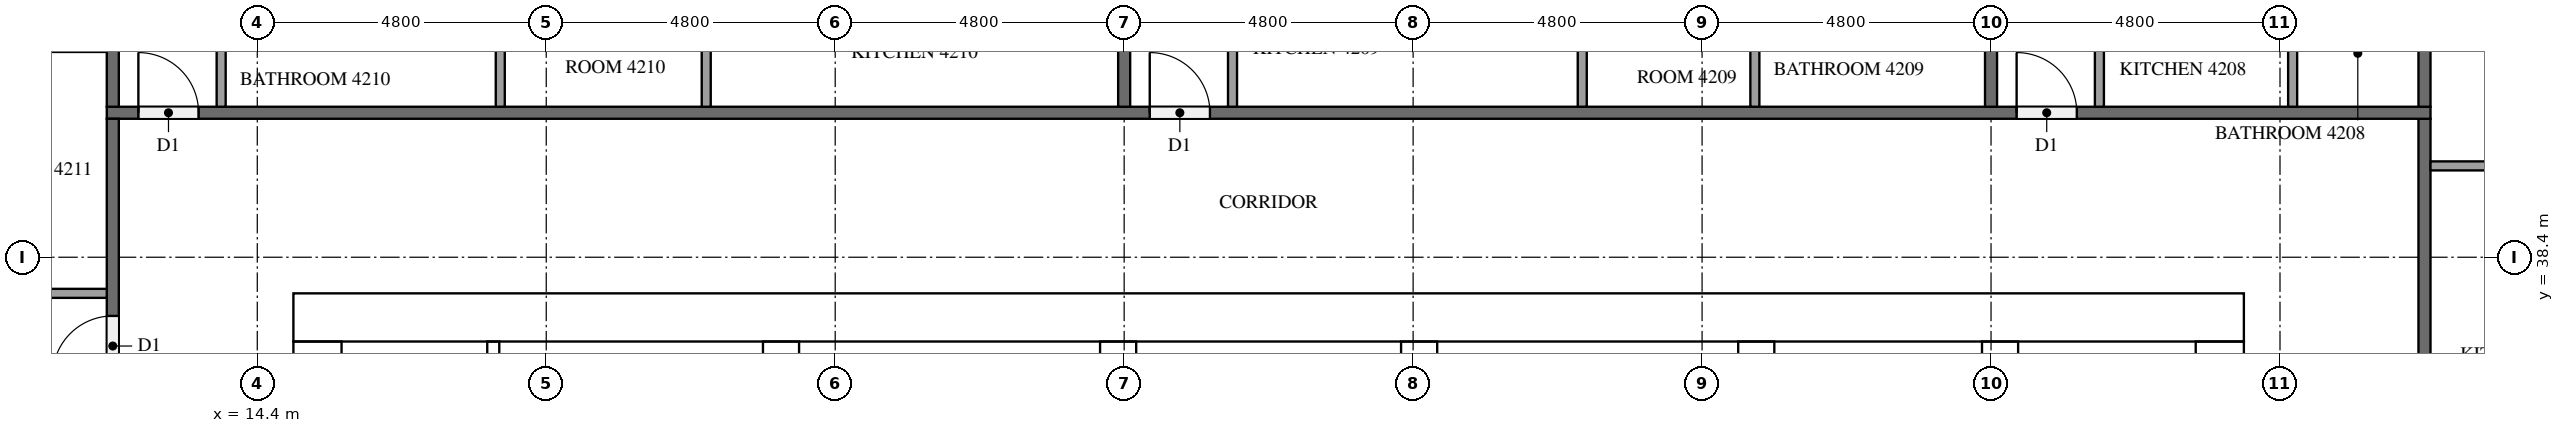
"""IFC4 building model, lengths in metres.
Left out: names, types, materials, properties, quantities, classifications, styles, units other than length and angle.
Written with IfcOpenShell. Run it as: python <this file> out.ifc"""

import sys

from ifc_helpers import new_model, si_unit, direction, frame, frame_2d, origin, place, context, subcontext, project, spatial, rectangle, extrude, element, fill, save


model = new_model("IFC4")
c1 = context("Model", 3, precision=1e-05, world=origin(), true_north=direction((0.0, 1.0)))
c2 = subcontext(c1, "Body", "Model", "MODEL_VIEW")
j1 = project(units=[si_unit("LENGTHUNIT", "METRE"), si_unit("PLANEANGLEUNIT", "RADIAN")], contexts=[c1])
p1 = place(None, origin())
s1 = spatial("IfcSite", under=j1, at=p1, CompositionType="ELEMENT")
p2 = place(p1, origin())
s2 = spatial("IfcBuilding", under=s1, at=p2, CompositionType="ELEMENT")
p3 = place(p2, frame((0.0, 0.0, 163.0)))
s3 = spatial("IfcBuildingStorey", under=s2, at=p3, CompositionType="ELEMENT", Elevation=163.0)
p4 = place(p3, frame((15.0, 37.4, 0.0), z_axis=(0.0, 0.0, 1.0), x_axis=(1.0, 0.0, 0.0)))
e1 = element("IfcWall", 1, at=p4, inside=s3, PredefinedType="SHEAR", context=c2, shape_type="SweptSolid", body=[
    extrude(rectangle(XDim=32.4, YDim=0.8, at=frame_2d((16.2, 0.0))), origin(), (0.0, 0.0, 1.0), 3.2),
])
p5 = place(p4, frame((15.3, 0.0, 0.0)))
e2 = element("IfcOpeningElement", 2, at=p5, cuts=e1, PredefinedType="OPENING", context=c2, shape_type="SweptSolid", body=[
    extrude(rectangle(XDim=1.8, YDim=2.1, at=frame_2d((0.9, 1.05))), frame((0.0, 0.41, 0.0), z_axis=(0.0, -1.0, 0.0), x_axis=(1.0, 0.0, 0.0)), (0.0, 0.0, 1.0), 0.82),
])
p6 = place(p4, frame((1.51, 0.0, 0.0)))
e3 = element("IfcOpeningElement", 3, at=p6, cuts=e1, PredefinedType="OPENING", context=c2, shape_type="SweptSolid", body=[
    extrude(rectangle(XDim=1.0, YDim=2.1, at=frame_2d((0.5, 1.05))), frame((0.0, 0.41, 0.0), z_axis=(0.0, -1.0, 0.0), x_axis=(1.0, 0.0, 0.0)), (0.0, 0.0, 1.0), 0.82),
])
p7 = place(p4, frame((5.11, 0.0, 0.0)))
e4 = element("IfcOpeningElement", 4, at=p7, cuts=e1, PredefinedType="OPENING", context=c2, shape_type="SweptSolid", body=[
    extrude(rectangle(XDim=1.0, YDim=2.1, at=frame_2d((0.5, 1.05))), frame((0.0, 0.41, 0.0), z_axis=(0.0, -1.0, 0.0), x_axis=(1.0, 0.0, 0.0)), (0.0, 0.0, 1.0), 0.82),
])
p8 = place(p3, frame((15.4, 15.8, 0.0), z_axis=(0.0, 0.0, 1.0), x_axis=(0.0, 1.0, 0.0)))
e5 = element("IfcWall", 5, at=p8, inside=s3, PredefinedType="SHEAR", context=c2, shape_type="SweptSolid", body=[
    extrude(rectangle(XDim=21.2, YDim=0.8, at=frame_2d((10.6, 0.0))), origin(), (0.0, 0.0, 1.0), 3.2),
])
p9 = place(p8, frame((4.96, 0.0, 0.0)))
e6 = element("IfcOpeningElement", 6, at=p9, cuts=e5, PredefinedType="OPENING", context=c2, shape_type="SweptSolid", body=[
    extrude(rectangle(XDim=1.2, YDim=2.1, at=frame_2d((0.6, 1.05))), frame((0.0, 0.41, 0.0), z_axis=(0.0, -1.0, 0.0), x_axis=(1.0, 0.0, 0.0)), (0.0, 0.0, 1.0), 0.82),
])
p10 = place(p3, frame((47.0, 15.8, 0.0), z_axis=(0.0, 0.0, 1.0), x_axis=(0.0, 1.0, 0.0)))
e7 = element("IfcWall", 7, at=p10, inside=s3, PredefinedType="SHEAR", context=c2, shape_type="SweptSolid", body=[
    extrude(rectangle(XDim=21.2, YDim=0.8, at=frame_2d((10.6, 0.0))), origin(), (0.0, 0.0, 1.0), 3.2),
])
p11 = place(p10, frame((10.3, 0.0, 0.0)))
e8 = element("IfcOpeningElement", 8, at=p11, cuts=e7, PredefinedType="OPENING", context=c2, shape_type="SweptSolid", body=[
    extrude(rectangle(XDim=1.2, YDim=2.1, at=frame_2d((0.6, 1.05))), frame((0.0, 0.41, 0.0), z_axis=(0.0, -1.0, 0.0), x_axis=(1.0, 0.0, 0.0)), (0.0, 0.0, 1.0), 0.82),
])
p12 = place(p3, frame((23.1, 15.8, 0.0), z_axis=(0.0, 0.0, 1.0), x_axis=(0.0, 1.0, 0.0)))
e9 = element("IfcWall", 9, at=p12, inside=s3, PredefinedType="SHEAR", context=c2, shape_type="SweptSolid", body=[
    extrude(rectangle(XDim=21.2, YDim=0.6, at=frame_2d((10.6, 0.0))), origin(), (0.0, 0.0, 1.0), 3.2),
])
p13 = place(p3, frame((39.3, 27.75, 0.0), z_axis=(0.0, 0.0, 1.0), x_axis=(0.0, 1.0, 0.0)))
e10 = element("IfcWall", 10, at=p13, inside=s3, PredefinedType="SHEAR", context=c2, shape_type="SweptSolid", body=[
    extrude(rectangle(XDim=9.25, YDim=0.6, at=frame_2d((4.625, 0.0))), origin(), (0.0, 0.0, 1.0), 3.2),
])
p14 = place(p3, frame((43.35, 27.75, 0.0), z_axis=(0.0, 0.0, 1.0), x_axis=(0.0, 1.0, 0.0)))
e11 = element("IfcWall", 11, at=p14, inside=s3, PredefinedType="SHEAR", context=c2, shape_type="SweptSolid", body=[
    extrude(rectangle(XDim=9.25, YDim=0.6, at=frame_2d((4.625, 0.0))), origin(), (0.0, 0.0, 1.0), 3.2),
])
p15 = place(p14, frame((7.65, 0.0, 0.0)))
e12 = element("IfcOpeningElement", 12, at=p15, cuts=e11, PredefinedType="OPENING", context=c2, shape_type="SweptSolid", body=[
    extrude(rectangle(XDim=1.2, YDim=2.1, at=frame_2d((0.6, 1.05))), frame((0.0, 0.31, 0.0), z_axis=(0.0, -1.0, 0.0), x_axis=(1.0, 0.0, 0.0)), (0.0, 0.0, 1.0), 0.62),
])
for number, where, z_axis, x_axis in (
    (13, (28.7, 33.85, 0.0), (0.0, 0.0, 1.0), (0.0, 1.0, 0.0)),
    (14, (33.7, 33.85, 0.0), (0.0, 0.0, 1.0), (0.0, 1.0, 0.0)),
):
    element("IfcWall", number, at=place(p3, frame(where, z_axis=z_axis, x_axis=x_axis)), inside=s3, PredefinedType="SHEAR", context=c2, shape_type="SweptSolid", body=[
        extrude(rectangle(XDim=3.15, YDim=0.6, at=frame_2d((1.575, 0.0))), origin(), (0.0, 0.0, 1.0), 3.2),
    ])
p16 = place(p3, frame((18.32, 31.55, 0.0), z_axis=(0.0, 0.0, 1.0), x_axis=(0.0, 1.0, 0.0)))
e15 = element("IfcWall", 15, at=p16, inside=s3, PredefinedType="PARTITIONING", context=c2, shape_type="SweptSolid", body=[
    extrude(rectangle(XDim=5.45, YDim=0.2, at=frame_2d((2.725, 0.0))), origin(), (0.0, 0.0, 1.0), 3.2),
])
p17 = place(p3, frame((50.4, 40.7, 0.0), z_axis=(0.0, 0.0, 1.0), x_axis=(0.0, -1.0, 0.0)))
e16 = element("IfcWall", 16, at=p17, inside=s3, PredefinedType="PARTITIONING", context=c2, shape_type="SweptSolid", body=[
    extrude(rectangle(XDim=28.6, YDim=0.2, at=frame_2d((14.3, 0.0))), origin(), (0.0, 0.0, 1.0), 3.2),
])
p18 = place(p17, frame((19.525, 0.0, 0.0)))
e17 = element("IfcOpeningElement", 17, at=p18, cuts=e16, PredefinedType="OPENING", context=c2, shape_type="SweptSolid", body=[
    extrude(rectangle(XDim=1.0, YDim=2.1, at=frame_2d((0.5, 1.05))), frame((0.0, 0.11, 0.0), z_axis=(0.0, -1.0, 0.0), x_axis=(1.0, 0.0, 0.0)), (0.0, 0.0, 1.0), 0.22),
])
p19 = place(p17, frame((17.675, 0.0, 0.0)))
e18 = element("IfcOpeningElement", 18, at=p19, cuts=e16, PredefinedType="OPENING", context=c2, shape_type="SweptSolid", body=[
    extrude(rectangle(XDim=1.0, YDim=2.1, at=frame_2d((0.5, 1.05))), frame((0.0, 0.11, 0.0), z_axis=(0.0, -1.0, 0.0), x_axis=(1.0, 0.0, 0.0)), (0.0, 0.0, 1.0), 0.22),
])
p20 = place(p17, frame((8.075, 0.0, 0.0)))
e19 = element("IfcOpeningElement", 19, at=p20, cuts=e16, PredefinedType="OPENING", context=c2, shape_type="SweptSolid", body=[
    extrude(rectangle(XDim=1.0, YDim=2.1, at=frame_2d((0.5, 1.05))), frame((0.0, 0.11, 0.0), z_axis=(0.0, -1.0, 0.0), x_axis=(1.0, 0.0, 0.0)), (0.0, 0.0, 1.0), 0.22),
])
p21 = place(p3, frame((11.9, 40.8, 0.0), z_axis=(0.0, 0.0, 1.0), x_axis=(1.0, 0.0, 0.0)))
e20 = element("IfcWall", 20, at=p21, inside=s3, PredefinedType="PARTITIONING", context=c2, shape_type="SweptSolid", body=[
    extrude(rectangle(XDim=38.6, YDim=0.2, at=frame_2d((19.3, 0.0))), origin(), (0.0, 0.0, 1.0), 3.2),
])
p22 = place(p21, frame((31.725, 0.0, 0.0)))
e21 = element("IfcOpeningElement", 21, at=p22, cuts=e20, PredefinedType="OPENING", context=c2, shape_type="SweptSolid", body=[
    extrude(rectangle(XDim=1.0, YDim=2.1, at=frame_2d((0.5, 1.05))), frame((0.0, 0.11, 0.0), z_axis=(0.0, -1.0, 0.0), x_axis=(1.0, 0.0, 0.0)), (0.0, 0.0, 1.0), 0.22),
])
p23 = place(p21, frame((17.325, 0.0, 0.0)))
e22 = element("IfcOpeningElement", 22, at=p23, cuts=e20, PredefinedType="OPENING", context=c2, shape_type="SweptSolid", body=[
    extrude(rectangle(XDim=1.0, YDim=2.1, at=frame_2d((0.5, 1.05))), frame((0.0, 0.11, 0.0), z_axis=(0.0, -1.0, 0.0), x_axis=(1.0, 0.0, 0.0)), (0.0, 0.0, 1.0), 0.22),
])
p24 = place(p21, frame((0.525, 0.0, 0.0)))
e23 = element("IfcOpeningElement", 23, at=p24, cuts=e20, PredefinedType="OPENING", context=c2, shape_type="SweptSolid", body=[
    extrude(rectangle(XDim=1.0, YDim=2.1, at=frame_2d((0.5, 1.05))), frame((0.0, 0.11, 0.0), z_axis=(0.0, -1.0, 0.0), x_axis=(1.0, 0.0, 0.0)), (0.0, 0.0, 1.0), 0.22),
])
p25 = place(p3, frame((12.0, 12.1, 0.0), z_axis=(0.0, 0.0, 1.0), x_axis=(0.0, 1.0, 0.0)))
e24 = element("IfcWall", 24, at=p25, inside=s3, PredefinedType="PARTITIONING", context=c2, shape_type="SweptSolid", body=[
    extrude(rectangle(XDim=28.6, YDim=0.2, at=frame_2d((14.3, 0.0))), origin(), (0.0, 0.0, 1.0), 3.2),
])
p26 = place(p25, frame((24.325, 0.0, 0.0)))
e25 = element("IfcOpeningElement", 25, at=p26, cuts=e24, PredefinedType="OPENING", context=c2, shape_type="SweptSolid", body=[
    extrude(rectangle(XDim=1.0, YDim=2.1, at=frame_2d((0.5, 1.05))), frame((0.0, 0.11, 0.0), z_axis=(0.0, -1.0, 0.0), x_axis=(1.0, 0.0, 0.0)), (0.0, 0.0, 1.0), 0.22),
])
p27 = place(p25, frame((22.475, 0.0, 0.0)))
e26 = element("IfcOpeningElement", 26, at=p27, cuts=e24, PredefinedType="OPENING", context=c2, shape_type="SweptSolid", body=[
    extrude(rectangle(XDim=1.0, YDim=2.1, at=frame_2d((0.5, 1.05))), frame((0.0, 0.11, 0.0), z_axis=(0.0, -1.0, 0.0), x_axis=(1.0, 0.0, 0.0)), (0.0, 0.0, 1.0), 0.22),
])
p28 = place(p25, frame((0.325, 0.0, 0.0)))
e27 = element("IfcOpeningElement", 27, at=p28, cuts=e24, PredefinedType="OPENING", context=c2, shape_type="SweptSolid", body=[
    extrude(rectangle(XDim=1.0, YDim=2.1, at=frame_2d((0.5, 1.05))), frame((0.0, 0.11, 0.0), z_axis=(0.0, -1.0, 0.0), x_axis=(1.0, 0.0, 0.0)), (0.0, 0.0, 1.0), 0.22),
])
p29 = place(p3, frame((50.4, 40.9, 0.0), z_axis=(0.0, 0.0, 1.0), x_axis=(0.0, 1.0, 0.0)))
e28 = element("IfcWall", 28, at=p29, inside=s3, PredefinedType="PARTITIONING", context=c2, shape_type="SweptSolid", body=[
    extrude(rectangle(XDim=7.0, YDim=0.2, at=frame_2d((3.5, 0.0))), origin(), (0.0, 0.0, 1.0), 3.2),
])
p30 = place(p3, frame((43.2, 47.625, 0.0), z_axis=(0.0, 0.0, 1.0), x_axis=(0.0, -1.0, 0.0)))
e29 = element("IfcWall", 29, at=p30, inside=s3, PredefinedType="PARTITIONING", context=c2, shape_type="SweptSolid", body=[
    extrude(rectangle(XDim=6.725, YDim=0.2, at=frame_2d((3.363, 0.0))), origin(), (0.0, 0.0, 1.0), 3.2),
])
for number, where, z_axis, x_axis in (
    (30, (28.8, 47.9, 0.0), (0.0, 0.0, 1.0), (0.0, -1.0, 0.0)),
    (31, (12.0, 47.9, 0.0), (0.0, 0.0, 1.0), (0.0, -1.0, 0.0)),
):
    element("IfcWall", number, at=place(p3, frame(where, z_axis=z_axis, x_axis=x_axis)), inside=s3, PredefinedType="PARTITIONING", context=c2, shape_type="SweptSolid", body=[
        extrude(rectangle(XDim=7.0, YDim=0.2, at=frame_2d((3.5, 0.0))), origin(), (0.0, 0.0, 1.0), 3.2),
    ])
p31 = place(p3, frame((50.5, 39.917, 0.0), z_axis=(0.0, 0.0, 1.0), x_axis=(1.0, 0.0, 0.0)))
e32 = element("IfcWall", 32, at=p31, inside=s3, PredefinedType="PARTITIONING", context=c2, shape_type="SweptSolid", body=[
    extrude(rectangle(XDim=2.375, YDim=0.15, at=frame_2d((1.188, 0.0))), origin(), (0.0, 0.0, 1.0), 3.2),
])
p32 = place(p3, frame((48.21, 40.9, 0.0), z_axis=(0.0, 0.0, 1.0), x_axis=(0.0, 1.0, 0.0)))
e33 = element("IfcWall", 33, at=p32, inside=s3, PredefinedType="PARTITIONING", context=c2, shape_type="SweptSolid", body=[
    extrude(rectangle(XDim=1.775, YDim=0.15, at=frame_2d((0.888, 0.0))), origin(), (0.0, 0.0, 1.0), 3.2),
])
for number, where, z_axis, x_axis in (
    (34, (45.0, 40.9, 0.0), (0.0, 0.0, 1.0), (0.0, 1.0, 0.0)),
    (35, (36.41, 40.9, 0.0), (0.0, 0.0, 1.0), (0.0, 1.0, 0.0)),
    (36, (39.277, 40.9, 0.0), (0.0, 0.0, 1.0), (0.0, 1.0, 0.0)),
):
    element("IfcWall", number, at=place(p3, frame(where, z_axis=z_axis, x_axis=x_axis)), inside=s3, PredefinedType="PARTITIONING", context=c2, shape_type="SweptSolid", body=[
        extrude(rectangle(XDim=1.925, YDim=0.15, at=frame_2d((0.962, 0.0))), origin(), (0.0, 0.0, 1.0), 3.2),
    ])
p33 = place(p3, frame((30.6, 40.9, 0.0), z_axis=(0.0, 0.0, 1.0), x_axis=(0.0, 1.0, 0.0)))
e37 = element("IfcWall", 37, at=p33, inside=s3, PredefinedType="PARTITIONING", context=c2, shape_type="SweptSolid", body=[
    extrude(rectangle(XDim=2.075, YDim=0.15, at=frame_2d((1.038, 0.0))), origin(), (0.0, 0.0, 1.0), 3.2),
])
for number, where, z_axis, x_axis in (
    (38, (18.437, 40.9, 0.0), (0.0, 0.0, 1.0), (0.0, 1.0, 0.0)),
    (39, (21.858, 40.9, 0.0), (0.0, 0.0, 1.0), (0.0, 1.0, 0.0)),
):
    element("IfcWall", number, at=place(p3, frame(where, z_axis=z_axis, x_axis=x_axis)), inside=s3, PredefinedType="PARTITIONING", context=c2, shape_type="SweptSolid", body=[
        extrude(rectangle(XDim=1.775, YDim=0.15, at=frame_2d((0.888, 0.0))), origin(), (0.0, 0.0, 1.0), 3.2),
    ])
p34 = place(p3, frame((13.8, 40.9, 0.0), z_axis=(0.0, 0.0, 1.0), x_axis=(0.0, 1.0, 0.0)))
e40 = element("IfcWall", 40, at=p34, inside=s3, PredefinedType="PARTITIONING", context=c2, shape_type="SweptSolid", body=[
    extrude(rectangle(XDim=1.925, YDim=0.15, at=frame_2d((0.962, 0.0))), origin(), (0.0, 0.0, 1.0), 3.2),
])
p35 = place(p3, frame((11.9, 37.8, 0.0), z_axis=(0.0, 0.0, 1.0), x_axis=(-1.0, 0.0, 0.0)))
e41 = element("IfcWall", 41, at=p35, inside=s3, PredefinedType="PARTITIONING", context=c2, shape_type="SweptSolid", body=[
    extrude(rectangle(XDim=3.125, YDim=0.15, at=frame_2d((1.562, 0.0))), origin(), (0.0, 0.0, 1.0), 3.2),
])
p36 = place(p5, origin())
e42 = element("IfcDoor", 42, at=p36, inside=s3, OperationType="DOUBLE_DOOR_SINGLE_SWING", PredefinedType="DOOR", context=c2, shape_type="SweptSolid", body=[
    extrude(rectangle(XDim=1.8, YDim=2.1, at=frame_2d((0.9, 1.05))), frame((0.0, 0.025, 0.0), z_axis=(0.0, -1.0, 0.0), x_axis=(1.0, 0.0, 0.0)), (0.0, 0.0, 1.0), 0.05),
])
fill(e2, e42)
p37 = place(p6, origin())
e43 = element("IfcDoor", 43, at=p37, inside=s3, OperationType="SINGLE_SWING_LEFT", PredefinedType="DOOR", context=c2, shape_type="SweptSolid", body=[
    extrude(rectangle(XDim=1.0, YDim=2.1, at=frame_2d((0.5, 1.05))), frame((0.0, 0.025, 0.0), z_axis=(0.0, -1.0, 0.0), x_axis=(1.0, 0.0, 0.0)), (0.0, 0.0, 1.0), 0.05),
])
fill(e3, e43)
p38 = place(p7, origin())
e44 = element("IfcDoor", 44, at=p38, inside=s3, OperationType="SINGLE_SWING_RIGHT", PredefinedType="DOOR", context=c2, shape_type="SweptSolid", body=[
    extrude(rectangle(XDim=1.0, YDim=2.1, at=frame_2d((0.5, 1.05))), frame((0.0, 0.025, 0.0), z_axis=(0.0, -1.0, 0.0), x_axis=(1.0, 0.0, 0.0)), (0.0, 0.0, 1.0), 0.05),
])
fill(e4, e44)
p39 = place(p22, origin())
e45 = element("IfcDoor", 45, at=p39, inside=s3, OperationType="SINGLE_SWING_LEFT", PredefinedType="DOOR", context=c2, shape_type="SweptSolid", body=[
    extrude(rectangle(XDim=1.0, YDim=2.1, at=frame_2d((0.5, 1.05))), frame((0.0, 0.025, 0.0), z_axis=(0.0, -1.0, 0.0), x_axis=(1.0, 0.0, 0.0)), (0.0, 0.0, 1.0), 0.05),
])
fill(e21, e45)
p40 = place(p23, origin())
e46 = element("IfcDoor", 46, at=p40, inside=s3, OperationType="SINGLE_SWING_LEFT", PredefinedType="DOOR", context=c2, shape_type="SweptSolid", body=[
    extrude(rectangle(XDim=1.0, YDim=2.1, at=frame_2d((0.5, 1.05))), frame((0.0, 0.025, 0.0), z_axis=(0.0, -1.0, 0.0), x_axis=(1.0, 0.0, 0.0)), (0.0, 0.0, 1.0), 0.05),
])
fill(e22, e46)
p41 = place(p24, origin())
e47 = element("IfcDoor", 47, at=p41, inside=s3, OperationType="SINGLE_SWING_LEFT", PredefinedType="DOOR", context=c2, shape_type="SweptSolid", body=[
    extrude(rectangle(XDim=1.0, YDim=2.1, at=frame_2d((0.5, 1.05))), frame((0.0, 0.025, 0.0), z_axis=(0.0, -1.0, 0.0), x_axis=(1.0, 0.0, 0.0)), (0.0, 0.0, 1.0), 0.05),
])
fill(e23, e47)
p42 = place(p26, origin())
e48 = element("IfcDoor", 48, at=p42, inside=s3, OperationType="SINGLE_SWING_LEFT", PredefinedType="DOOR", context=c2, shape_type="SweptSolid", body=[
    extrude(rectangle(XDim=1.0, YDim=2.1, at=frame_2d((0.5, 1.05))), frame((0.0, 0.025, 0.0), z_axis=(0.0, -1.0, 0.0), x_axis=(1.0, 0.0, 0.0)), (0.0, 0.0, 1.0), 0.05),
])
fill(e25, e48)
save(model, sys.argv[1])
